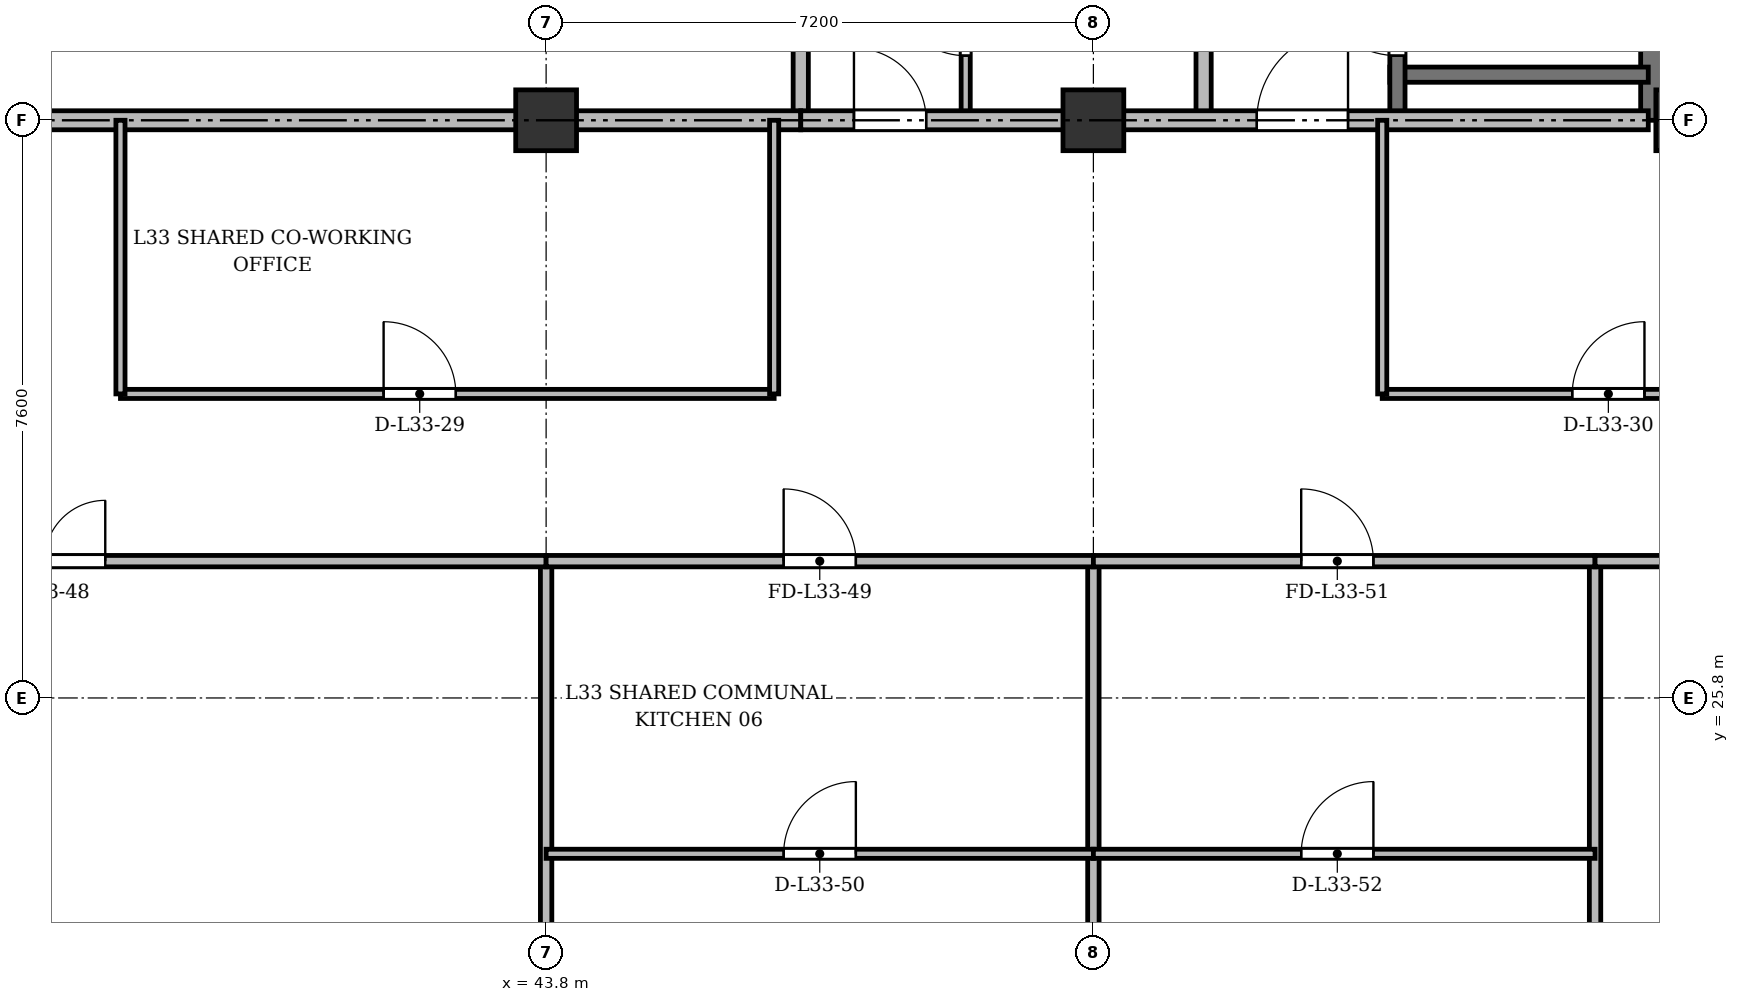
"""IFC4 building model, lengths in metres.
Left out: names, types, materials, properties, quantities, classifications, styles, units other than length and angle.
Written with IfcOpenShell. Run it as: python <this file> out.ifc"""

import sys

from ifc_helpers import new_model, si_unit, direction, frame, frame_2d, origin, origin_2d, place, context, subcontext, project, spatial, rectangle, extrude, source, transform, mapped, element, fill, save


model = new_model("IFC4")
c1 = context("Model", 3, precision=1e-05, world=origin(), true_north=direction((0.0, 1.0)))
c2 = subcontext(c1, "Body", "Model", "MODEL_VIEW")
j1 = project(units=[si_unit("LENGTHUNIT", "METRE"), si_unit("PLANEANGLEUNIT", "RADIAN")], contexts=[c1])
p1 = place(None, origin())
s1 = spatial("IfcSite", under=j1, at=p1, CompositionType="ELEMENT")
p2 = place(p1, origin())
s2 = spatial("IfcBuilding", under=s1, at=p2, CompositionType="ELEMENT")
p3 = place(p2, frame((0.0, 0.0, 128.5)))
s3 = spatial("IfcBuildingStorey", under=s2, at=p3, CompositionType="ELEMENT", Elevation=128.5)
m1 = source(origin(), c2, "Body", "SweptSolid", [
    extrude(rectangle(XDim=0.8, YDim=0.8, at=origin_2d()), origin(), (0.0, 0.0, 1.0), 3.6),
])
for number, where, z_axis, x_axis in (
    (1, (43.8, 33.4, 0.0), (0.0, 0.0, 1.0), (1.0, 0.0, 0.0)),
    (2, (51.0, 33.4, 0.0), (0.0, 0.0, 1.0), (1.0, 0.0, 0.0)),
    (3, (58.8, 33.4, 0.0), (0.0, 0.0, 1.0), (1.0, 0.0, 0.0)),
):
    element("IfcColumn", number, at=place(p3, frame(where, z_axis=z_axis, x_axis=x_axis)), inside=s3, PredefinedType="COLUMN", context=c2, shape_type="MappedRepresentation", body=[
        mapped(m1, transform((0.0, 0.0, 0.0), x_axis=(1.0, 0.0, 0.0), y_axis=(0.0, 1.0, 0.0), z_axis=(0.0, 0.0, 1.0), scale=1.0)),
    ])
p4 = place(p3, frame((58.55, 33.4, 0.0), z_axis=(0.0, 0.0, 1.0), x_axis=(0.0, 1.0, 0.0)))
e4 = element("IfcWall", 4, at=p4, inside=s3, PredefinedType="SHEAR", context=c2, shape_type="SweptSolid", body=[
    extrude(rectangle(XDim=11.7, YDim=0.7, at=frame_2d((5.85, 0.0))), origin(), (0.0, 0.0, 1.0), 3.22),
])
p5 = place(p3, frame((54.9, 34.0, 0.0), z_axis=(0.0, 0.0, 1.0), x_axis=(1.0, 0.0, 0.0)))
e5 = element("IfcWall", 5, at=p5, inside=s3, PredefinedType="SHEAR", context=c2, shape_type="SweptSolid", body=[
    extrude(rectangle(XDim=3.4, YDim=0.2, at=frame_2d((1.7, 0.0))), origin(), (0.0, 0.0, 1.0), 3.22),
])
p6 = place(p3, frame((55.0, 33.4, 0.0), z_axis=(0.0, 0.0, 1.0), x_axis=(0.0, 1.0, 0.0)))
e6 = element("IfcWall", 6, at=p6, inside=s3, PredefinedType="SHEAR", context=c2, shape_type="SweptSolid", body=[
    extrude(rectangle(XDim=11.1, YDim=0.2, at=frame_2d((5.55, 0.0))), origin(), (0.0, 0.0, 1.0), 3.22),
])
p7 = place(p6, frame((0.85, 0.0, 0.0)))
e7 = element("IfcOpeningElement", 7, at=p7, cuts=e6, PredefinedType="OPENING", context=c2, shape_type="SweptSolid", body=[
    extrude(rectangle(XDim=1.1, YDim=2.15, at=frame_2d((0.55, 1.075))), frame((0.0, 0.11, 0.0), z_axis=(0.0, -1.0, 0.0), x_axis=(1.0, 0.0, 0.0)), (0.0, 0.0, 1.0), 0.22),
])
p8 = place(p3, frame((47.15, 33.4, 0.0), z_axis=(0.0, 0.0, 1.0), x_axis=(0.0, 1.0, 0.0)))
e8 = element("IfcWall", 8, at=p8, inside=s3, PredefinedType="SOLIDWALL", context=c2, shape_type="SweptSolid", body=[
    extrude(rectangle(XDim=11.3, YDim=0.2, at=frame_2d((5.65, 0.0))), origin(), (0.0, 0.0, 1.0), 2.632),
])
p9 = place(p3, frame((26.3, 33.4, 0.0), z_axis=(0.0, 0.0, 1.0), x_axis=(1.0, 0.0, 0.0)))
e9 = element("IfcWall", 9, at=p9, inside=s3, PredefinedType="PARTITIONING", context=c2, shape_type="SweptSolid", body=[
    extrude(rectangle(XDim=20.85, YDim=0.25, at=frame_2d((10.425, 0.0))), origin(), (0.0, 0.0, 1.0), 2.632),
])
p10 = place(p9, frame((9.2, 0.0, 0.0)))
e10 = element("IfcOpeningElement", 10, at=p10, cuts=e9, PredefinedType="OPENING", context=c2, shape_type="SweptSolid", body=[
    extrude(rectangle(XDim=1.6, YDim=2.2, at=frame_2d((0.8, 1.1))), frame((0.0, 0.135, 0.0), z_axis=(0.0, -1.0, 0.0), x_axis=(1.0, 0.0, 0.0)), (0.0, 0.0, 1.0), 0.27),
])
p11 = place(p3, frame((52.45, 33.4, 0.0), z_axis=(0.0, 0.0, 1.0), x_axis=(0.0, 1.0, 0.0)))
e11 = element("IfcWall", 11, at=p11, inside=s3, PredefinedType="PARTITIONING", context=c2, shape_type="SweptSolid", body=[
    extrude(rectangle(XDim=8.65, YDim=0.2, at=frame_2d((4.325, 0.0))), origin(), (0.0, 0.0, 1.0), 2.632),
])
p12 = place(p11, frame((6.2, 0.0, 0.0)))
e12 = element("IfcOpeningElement", 12, at=p12, cuts=e11, PredefinedType="OPENING", context=c2, shape_type="SweptSolid", body=[
    extrude(rectangle(XDim=0.95, YDim=2.15, at=frame_2d((0.475, 1.075))), frame((0.0, 0.11, 0.0), z_axis=(0.0, -1.0, 0.0), x_axis=(1.0, 0.0, 0.0)), (0.0, 0.0, 1.0), 0.22),
])
p13 = place(p3, frame((49.32, 33.4, 0.0), z_axis=(0.0, 0.0, 1.0), x_axis=(0.0, 1.0, 0.0)))
e13 = element("IfcWall", 13, at=p13, inside=s3, PredefinedType="PARTITIONING", context=c2, shape_type="SweptSolid", body=[
    extrude(rectangle(XDim=8.6, YDim=0.12, at=frame_2d((4.3, 0.0))), origin(), (0.0, 0.0, 1.0), 2.632),
])
p14 = place(p13, frame((0.85, 0.0, 0.0)))
e14 = element("IfcOpeningElement", 14, at=p14, cuts=e13, PredefinedType="OPENING", context=c2, shape_type="SweptSolid", body=[
    extrude(rectangle(XDim=0.95, YDim=2.15, at=frame_2d((0.475, 1.075))), frame((0.0, 0.07, 0.0), z_axis=(0.0, -1.0, 0.0), x_axis=(1.0, 0.0, 0.0)), (0.0, 0.0, 1.0), 0.14),
])
p15 = place(p13, frame((3.55, 0.0, 0.0)))
e15 = element("IfcOpeningElement", 15, at=p15, cuts=e13, PredefinedType="OPENING", context=c2, shape_type="SweptSolid", body=[
    extrude(rectangle(XDim=0.95, YDim=2.15, at=frame_2d((0.475, 1.075))), frame((0.0, 0.07, 0.0), z_axis=(0.0, -1.0, 0.0), x_axis=(1.0, 0.0, 0.0)), (0.0, 0.0, 1.0), 0.14),
])
p16 = place(p13, frame((6.3, 0.0, 0.0)))
e16 = element("IfcOpeningElement", 16, at=p16, cuts=e13, PredefinedType="OPENING", context=c2, shape_type="SweptSolid", body=[
    extrude(rectangle(XDim=0.95, YDim=2.15, at=frame_2d((0.475, 1.075))), frame((0.0, 0.07, 0.0), z_axis=(0.0, -1.0, 0.0), x_axis=(1.0, 0.0, 0.0)), (0.0, 0.0, 1.0), 0.14),
])
p17 = place(p3, frame((47.15, 33.4, 0.0), z_axis=(0.0, 0.0, 1.0), x_axis=(1.0, 0.0, 0.0)))
e17 = element("IfcWall", 17, at=p17, inside=s3, PredefinedType="PARTITIONING", context=c2, shape_type="SweptSolid", body=[
    extrude(rectangle(XDim=11.15, YDim=0.25, at=frame_2d((5.575, 0.0))), origin(), (0.0, 0.0, 1.0), 2.632),
])
p18 = place(p17, frame((0.7, 0.0, 0.0)))
e18 = element("IfcOpeningElement", 18, at=p18, cuts=e17, PredefinedType="OPENING", context=c2, shape_type="SweptSolid", body=[
    extrude(rectangle(XDim=0.95, YDim=2.15, at=frame_2d((0.475, 1.075))), frame((0.0, 0.135, 0.0), z_axis=(0.0, -1.0, 0.0), x_axis=(1.0, 0.0, 0.0)), (0.0, 0.0, 1.0), 0.27),
])
p19 = place(p17, frame((6.0, 0.0, 0.0)))
e19 = element("IfcOpeningElement", 19, at=p19, cuts=e17, PredefinedType="OPENING", context=c2, shape_type="SweptSolid", body=[
    extrude(rectangle(XDim=1.2, YDim=2.15, at=frame_2d((0.6, 1.075))), frame((0.0, 0.135, 0.0), z_axis=(0.0, -1.0, 0.0), x_axis=(1.0, 0.0, 0.0)), (0.0, 0.0, 1.0), 0.27),
])
p20 = place(p3, frame((38.2, 29.8, 0.0), z_axis=(0.0, 0.0, 1.0), x_axis=(1.0, 0.0, 0.0)))
e20 = element("IfcWall", 20, at=p20, inside=s3, PredefinedType="PARTITIONING", context=c2, shape_type="SweptSolid", body=[
    extrude(rectangle(XDim=8.6, YDim=0.12, at=frame_2d((4.3, 0.0))), origin(), (0.0, 0.0, 1.0), 2.72),
])
p21 = place(p20, frame((3.462, 0.0, 0.0)))
e21 = element("IfcOpeningElement", 21, at=p21, cuts=e20, PredefinedType="OPENING", context=c2, shape_type="SweptSolid", body=[
    extrude(rectangle(XDim=0.95, YDim=2.15, at=frame_2d((0.475, 1.075))), frame((0.0, 0.07, 0.0), z_axis=(0.0, -1.0, 0.0), x_axis=(1.0, 0.0, 0.0)), (0.0, 0.0, 1.0), 0.14),
])
p22 = place(p3, frame((54.8, 29.8, 0.0), z_axis=(0.0, 0.0, 1.0), x_axis=(1.0, 0.0, 0.0)))
e22 = element("IfcWall", 22, at=p22, inside=s3, PredefinedType="PARTITIONING", context=c2, shape_type="SweptSolid", body=[
    extrude(rectangle(XDim=14.85, YDim=0.12, at=frame_2d((7.425, 0.0))), origin(), (0.0, 0.0, 1.0), 2.72),
])
p23 = place(p22, frame((2.5, 0.0, 0.0)))
e23 = element("IfcOpeningElement", 23, at=p23, cuts=e22, PredefinedType="OPENING", context=c2, shape_type="SweptSolid", body=[
    extrude(rectangle(XDim=0.95, YDim=2.15, at=frame_2d((0.475, 1.075))), frame((0.0, 0.07, 0.0), z_axis=(0.0, -1.0, 0.0), x_axis=(1.0, 0.0, 0.0)), (0.0, 0.0, 1.0), 0.14),
])
p24 = place(p22, frame((9.2, 0.0, 0.0)))
e24 = element("IfcOpeningElement", 24, at=p24, cuts=e22, PredefinedType="OPENING", context=c2, shape_type="SweptSolid", body=[
    extrude(rectangle(XDim=0.95, YDim=2.15, at=frame_2d((0.475, 1.075))), frame((0.0, 0.07, 0.0), z_axis=(0.0, -1.0, 0.0), x_axis=(1.0, 0.0, 0.0)), (0.0, 0.0, 1.0), 0.14),
])
for number, where, z_axis, x_axis in (
    (25, (38.2, 29.8, 0.0), (0.0, 0.0, 1.0), (0.0, 1.0, 0.0)),
    (26, (46.8, 29.8, 0.0), (0.0, 0.0, 1.0), (0.0, 1.0, 0.0)),
    (27, (54.8, 29.8, 0.0), (0.0, 0.0, 1.0), (0.0, 1.0, 0.0)),
):
    element("IfcWall", number, at=place(p3, frame(where, z_axis=z_axis, x_axis=x_axis)), inside=s3, PredefinedType="PARTITIONING", context=c2, shape_type="SweptSolid", body=[
        extrude(rectangle(XDim=3.6, YDim=0.12, at=frame_2d((1.8, 0.0))), origin(), (0.0, 0.0, 1.0), 2.632),
    ])
p25 = place(p3, frame((43.8, 3.145, 0.0), z_axis=(0.0, 0.0, 1.0), x_axis=(0.0, 1.0, 0.0)))
e28 = element("IfcWall", 28, at=p25, inside=s3, PredefinedType="PARTITIONING", context=c2, shape_type="SweptSolid", body=[
    extrude(rectangle(XDim=24.455, YDim=0.15, at=frame_2d((12.228, 0.0))), origin(), (0.0, 0.0, 1.0), 2.72),
])
p26 = place(p3, frame((51.0, 6.41, 0.0), z_axis=(0.0, 0.0, 1.0), x_axis=(0.0, 1.0, 0.0)))
e29 = element("IfcWall", 29, at=p26, inside=s3, PredefinedType="PARTITIONING", context=c2, shape_type="SweptSolid", body=[
    extrude(rectangle(XDim=21.19, YDim=0.15, at=frame_2d((10.595, 0.0))), origin(), (0.0, 0.0, 1.0), 2.72),
])
p27 = place(p3, frame((57.6, 6.397, 0.0), z_axis=(0.0, 0.0, 1.0), x_axis=(0.0, 1.0, 0.0)))
e30 = element("IfcWall", 30, at=p27, inside=s3, PredefinedType="PARTITIONING", context=c2, shape_type="SweptSolid", body=[
    extrude(rectangle(XDim=21.203, YDim=0.15, at=frame_2d((10.602, 0.0))), origin(), (0.0, 0.0, 1.0), 2.632),
])
p28 = place(p3, frame((30.6, 27.6, 0.0), z_axis=(0.0, 0.0, 1.0), x_axis=(1.0, 0.0, 0.0)))
e31 = element("IfcWall", 31, at=p28, inside=s3, PredefinedType="PARTITIONING", context=c2, shape_type="SweptSolid", body=[
    extrude(rectangle(XDim=13.2, YDim=0.15, at=frame_2d((6.6, 0.0))), origin(), (0.0, 0.0, 1.0), 2.72),
])
p29 = place(p28, frame((5.8, 0.0, 0.0)))
e32 = element("IfcOpeningElement", 32, at=p29, cuts=e31, PredefinedType="OPENING", context=c2, shape_type="SweptSolid", body=[
    extrude(rectangle(XDim=1.6, YDim=2.2, at=frame_2d((0.8, 1.1))), frame((0.0, 0.085, 0.0), z_axis=(0.0, -1.0, 0.0), x_axis=(1.0, 0.0, 0.0)), (0.0, 0.0, 1.0), 0.17),
])
p30 = place(p3, frame((43.8, 27.6, 0.0), z_axis=(0.0, 0.0, 1.0), x_axis=(1.0, 0.0, 0.0)))
e33 = element("IfcWall", 33, at=p30, inside=s3, PredefinedType="PARTITIONING", context=c2, shape_type="SweptSolid", body=[
    extrude(rectangle(XDim=7.2, YDim=0.15, at=frame_2d((3.6, 0.0))), origin(), (0.0, 0.0, 1.0), 2.72),
])
p31 = place(p30, frame((3.125, 0.0, 0.0)))
e34 = element("IfcOpeningElement", 34, at=p31, cuts=e33, PredefinedType="OPENING", context=c2, shape_type="SweptSolid", body=[
    extrude(rectangle(XDim=0.95, YDim=2.15, at=frame_2d((0.475, 1.075))), frame((0.0, 0.085, 0.0), z_axis=(0.0, -1.0, 0.0), x_axis=(1.0, 0.0, 0.0)), (0.0, 0.0, 1.0), 0.17),
])
p32 = place(p3, frame((43.8, 23.75, 0.0), z_axis=(0.0, 0.0, 1.0), x_axis=(1.0, 0.0, 0.0)))
e35 = element("IfcWall", 35, at=p32, inside=s3, PredefinedType="PARTITIONING", context=c2, shape_type="SweptSolid", body=[
    extrude(rectangle(XDim=7.2, YDim=0.12, at=frame_2d((3.6, 0.0))), origin(), (0.0, 0.0, 1.0), 2.72),
])
p33 = place(p32, frame((3.125, 0.0, 0.0)))
e36 = element("IfcOpeningElement", 36, at=p33, cuts=e35, PredefinedType="OPENING", context=c2, shape_type="SweptSolid", body=[
    extrude(rectangle(XDim=0.95, YDim=2.15, at=frame_2d((0.475, 1.075))), frame((0.0, 0.07, 0.0), z_axis=(0.0, -1.0, 0.0), x_axis=(1.0, 0.0, 0.0)), (0.0, 0.0, 1.0), 0.14),
])
p34 = place(p3, frame((51.0, 27.6, 0.0), z_axis=(0.0, 0.0, 1.0), x_axis=(1.0, 0.0, 0.0)))
e37 = element("IfcWall", 37, at=p34, inside=s3, PredefinedType="PARTITIONING", context=c2, shape_type="SweptSolid", body=[
    extrude(rectangle(XDim=6.6, YDim=0.15, at=frame_2d((3.3, 0.0))), origin(), (0.0, 0.0, 1.0), 2.72),
])
p35 = place(p34, frame((2.734, 0.0, 0.0)))
e38 = element("IfcOpeningElement", 38, at=p35, cuts=e37, PredefinedType="OPENING", context=c2, shape_type="SweptSolid", body=[
    extrude(rectangle(XDim=0.95, YDim=2.15, at=frame_2d((0.475, 1.075))), frame((0.0, 0.085, 0.0), z_axis=(0.0, -1.0, 0.0), x_axis=(1.0, 0.0, 0.0)), (0.0, 0.0, 1.0), 0.17),
])
p36 = place(p3, frame((51.0, 23.75, 0.0), z_axis=(0.0, 0.0, 1.0), x_axis=(1.0, 0.0, 0.0)))
e39 = element("IfcWall", 39, at=p36, inside=s3, PredefinedType="PARTITIONING", context=c2, shape_type="SweptSolid", body=[
    extrude(rectangle(XDim=6.6, YDim=0.12, at=frame_2d((3.3, 0.0))), origin(), (0.0, 0.0, 1.0), 2.72),
])
p37 = place(p36, frame((2.734, 0.0, 0.0)))
e40 = element("IfcOpeningElement", 40, at=p37, cuts=e39, PredefinedType="OPENING", context=c2, shape_type="SweptSolid", body=[
    extrude(rectangle(XDim=0.95, YDim=2.15, at=frame_2d((0.475, 1.075))), frame((0.0, 0.07, 0.0), z_axis=(0.0, -1.0, 0.0), x_axis=(1.0, 0.0, 0.0)), (0.0, 0.0, 1.0), 0.14),
])
p38 = place(p3, frame((57.6, 27.6, 0.0), z_axis=(0.0, 0.0, 1.0), x_axis=(1.0, 0.0, 0.0)))
e41 = element("IfcWall", 41, at=p38, inside=s3, PredefinedType="PARTITIONING", context=c2, shape_type="SweptSolid", body=[
    extrude(rectangle(XDim=6.6, YDim=0.15, at=frame_2d((3.3, 0.0))), origin(), (0.0, 0.0, 1.0), 2.72),
])
p39 = place(p38, frame((2.734, 0.0, 0.0)))
e42 = element("IfcOpeningElement", 42, at=p39, cuts=e41, PredefinedType="OPENING", context=c2, shape_type="SweptSolid", body=[
    extrude(rectangle(XDim=0.95, YDim=2.15, at=frame_2d((0.475, 1.075))), frame((0.0, 0.085, 0.0), z_axis=(0.0, -1.0, 0.0), x_axis=(1.0, 0.0, 0.0)), (0.0, 0.0, 1.0), 0.17),
])
m2 = source(origin(), c2, "Body", "SweptSolid", [
    extrude(rectangle(XDim=1.1, YDim=2.15, at=frame_2d((0.55, 1.075))), frame((0.0, 0.025, 0.0), z_axis=(0.0, -1.0, 0.0), x_axis=(1.0, 0.0, 0.0)), (0.0, 0.0, 1.0), 0.05),
])
p40 = place(p7, origin())
e43 = element("IfcDoor", 43, at=p40, inside=s3, OperationType="SINGLE_SWING_RIGHT", PredefinedType="DOOR", context=c2, shape_type="MappedRepresentation", body=[
    mapped(m2, transform((0.0, 0.0, 0.0), x_axis=(1.0, 0.0, 0.0), y_axis=(0.0, 1.0, 0.0), z_axis=(0.0, 0.0, 1.0), scale=1.0)),
])
fill(e7, e43)
m3 = source(origin(), c2, "Body", "SweptSolid", [
    extrude(rectangle(XDim=0.95, YDim=2.15, at=frame_2d((0.475, 1.075))), frame((0.0, 0.025, 0.0), z_axis=(0.0, -1.0, 0.0), x_axis=(1.0, 0.0, 0.0)), (0.0, 0.0, 1.0), 0.05),
])
p41 = place(p14, origin())
e44 = element("IfcDoor", 44, at=p41, inside=s3, OperationType="SINGLE_SWING_RIGHT", PredefinedType="DOOR", context=c2, shape_type="MappedRepresentation", body=[
    mapped(m3, transform((0.0, 0.0, 0.0), x_axis=(1.0, 0.0, 0.0), y_axis=(0.0, 1.0, 0.0), z_axis=(0.0, 0.0, 1.0), scale=1.0)),
])
fill(e14, e44)
p42 = place(p18, origin())
e45 = element("IfcDoor", 45, at=p42, inside=s3, OperationType="SINGLE_SWING_LEFT", PredefinedType="DOOR", context=c2, shape_type="MappedRepresentation", body=[
    mapped(m3, transform((0.0, 0.0, 0.0), x_axis=(1.0, 0.0, 0.0), y_axis=(0.0, 1.0, 0.0), z_axis=(0.0, 0.0, 1.0), scale=1.0)),
])
fill(e18, e45)
m4 = source(origin(), c2, "Body", "SweptSolid", [
    extrude(rectangle(XDim=1.2, YDim=2.15, at=frame_2d((0.6, 1.075))), frame((0.0, 0.025, 0.0), z_axis=(0.0, -1.0, 0.0), x_axis=(1.0, 0.0, 0.0)), (0.0, 0.0, 1.0), 0.05),
])
p43 = place(p19, origin())
e46 = element("IfcDoor", 46, at=p43, inside=s3, OperationType="SINGLE_SWING_RIGHT", PredefinedType="DOOR", context=c2, shape_type="MappedRepresentation", body=[
    mapped(m4, transform((0.0, 0.0, 0.0), x_axis=(1.0, 0.0, 0.0), y_axis=(0.0, 1.0, 0.0), z_axis=(0.0, 0.0, 1.0), scale=1.0)),
])
fill(e19, e46)
p44 = place(p21, origin())
e47 = element("IfcDoor", 47, at=p44, inside=s3, OperationType="SINGLE_SWING_LEFT", PredefinedType="DOOR", context=c2, shape_type="MappedRepresentation", body=[
    mapped(m3, transform((0.0, 0.0, 0.0), x_axis=(1.0, 0.0, 0.0), y_axis=(0.0, 1.0, 0.0), z_axis=(0.0, 0.0, 1.0), scale=1.0)),
])
fill(e21, e47)
p45 = place(p23, origin())
e48 = element("IfcDoor", 48, at=p45, inside=s3, OperationType="SINGLE_SWING_RIGHT", PredefinedType="DOOR", context=c2, shape_type="MappedRepresentation", body=[
    mapped(m3, transform((0.0, 0.0, 0.0), x_axis=(1.0, 0.0, 0.0), y_axis=(0.0, 1.0, 0.0), z_axis=(0.0, 0.0, 1.0), scale=1.0)),
])
fill(e23, e48)
m5 = source(origin(), c2, "Body", "SweptSolid", [
    extrude(rectangle(XDim=1.6, YDim=2.2, at=frame_2d((0.8, 1.1))), frame((0.0, 0.025, 0.0), z_axis=(0.0, -1.0, 0.0), x_axis=(1.0, 0.0, 0.0)), (0.0, 0.0, 1.0), 0.05),
])
p46 = place(p29, origin())
e49 = element("IfcDoor", 49, at=p46, inside=s3, OperationType="DOUBLE_DOOR_SINGLE_SWING", PredefinedType="DOOR", context=c2, shape_type="MappedRepresentation", body=[
    mapped(m5, transform((0.0, 0.0, 0.0), x_axis=(1.0, 0.0, 0.0), y_axis=(0.0, 1.0, 0.0), z_axis=(0.0, 0.0, 1.0), scale=1.0)),
])
fill(e32, e49)
p47 = place(p31, origin())
e50 = element("IfcDoor", 50, at=p47, inside=s3, OperationType="SINGLE_SWING_LEFT", PredefinedType="DOOR", context=c2, shape_type="MappedRepresentation", body=[
    mapped(m3, transform((0.0, 0.0, 0.0), x_axis=(1.0, 0.0, 0.0), y_axis=(0.0, 1.0, 0.0), z_axis=(0.0, 0.0, 1.0), scale=1.0)),
])
fill(e34, e50)
p48 = place(p33, origin())
e51 = element("IfcDoor", 51, at=p48, inside=s3, OperationType="SINGLE_SWING_RIGHT", PredefinedType="DOOR", context=c2, shape_type="MappedRepresentation", body=[
    mapped(m3, transform((0.0, 0.0, 0.0), x_axis=(1.0, 0.0, 0.0), y_axis=(0.0, 1.0, 0.0), z_axis=(0.0, 0.0, 1.0), scale=1.0)),
])
fill(e36, e51)
p49 = place(p35, origin())
e52 = element("IfcDoor", 52, at=p49, inside=s3, OperationType="SINGLE_SWING_LEFT", PredefinedType="DOOR", context=c2, shape_type="MappedRepresentation", body=[
    mapped(m3, transform((0.0, 0.0, 0.0), x_axis=(1.0, 0.0, 0.0), y_axis=(0.0, 1.0, 0.0), z_axis=(0.0, 0.0, 1.0), scale=1.0)),
])
fill(e38, e52)
p50 = place(p37, origin())
e53 = element("IfcDoor", 53, at=p50, inside=s3, OperationType="SINGLE_SWING_RIGHT", PredefinedType="DOOR", context=c2, shape_type="MappedRepresentation", body=[
    mapped(m3, transform((0.0, 0.0, 0.0), x_axis=(1.0, 0.0, 0.0), y_axis=(0.0, 1.0, 0.0), z_axis=(0.0, 0.0, 1.0), scale=1.0)),
])
fill(e40, e53)
save(model, sys.argv[1])
